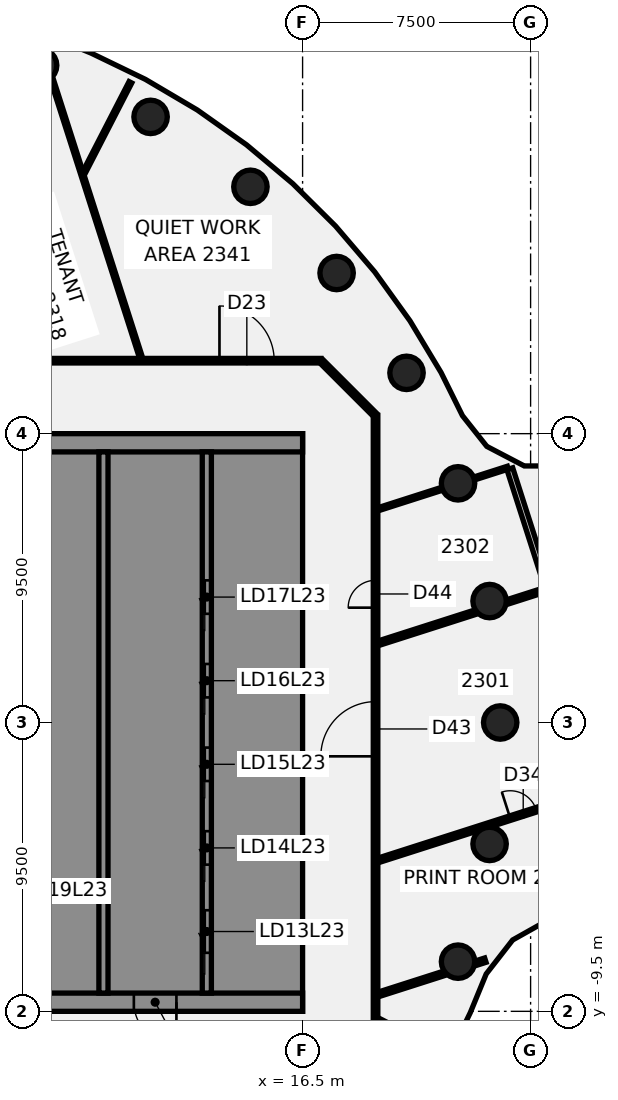
"""IFC4 building model, lengths in metres.
Left out: names, types, materials, properties, quantities, classifications, styles, units other than length and angle.
Written with IfcOpenShell. Run it as: python <this file> out.ifc"""

import sys

from ifc_helpers import new_model, si_unit, direction, frame, frame_2d, origin, origin_2d, place, context, subcontext, project, spatial, polyline, rectangle, circle, outline, extrude, element, fill, save


model = new_model("IFC4")
c1 = context("Model", 3, precision=1e-05, world=origin(), true_north=direction((0.0, 1.0)))
c2 = subcontext(c1, "Body", "Model", "MODEL_VIEW")
j1 = project(units=[si_unit("LENGTHUNIT", "METRE"), si_unit("PLANEANGLEUNIT", "RADIAN")], contexts=[c1])
p1 = place(None, origin())
s1 = spatial("IfcSite", under=j1, at=p1, CompositionType="ELEMENT")
p2 = place(p1, origin())
s2 = spatial("IfcBuilding", under=s1, at=p2, CompositionType="ELEMENT")
p3 = place(p2, frame((0.0, 0.0, 98.5)))
s3 = spatial("IfcBuildingStorey", under=s2, at=p3, CompositionType="ELEMENT", Elevation=98.5)
for number, where, z_axis, x_axis in (
    (1, (23.0, 0.0, -0.14), (0.0, 0.0, 1.0), (1.0, 0.0, 0.0)),
    (2, (22.651, 3.994, -0.14), (0.0, 0.0, 1.0), (1.0, 0.0, 0.0)),
    (3, (21.613, 7.866, -0.14), (0.0, 0.0, 1.0), (1.0, 0.0, 0.0)),
    (4, (19.919, 11.5, -0.14), (0.0, 0.0, 1.0), (1.0, 0.0, 0.0)),
    (5, (17.619, 14.784, -0.14), (0.0, 0.0, 1.0), (1.0, 0.0, 0.0)),
    (6, (14.784, 17.619, -0.14), (0.0, 0.0, 1.0), (1.0, 0.0, 0.0)),
    (7, (11.5, 19.919, -0.14), (0.0, 0.0, 1.0), (1.0, 0.0, 0.0)),
    (8, (7.866, 21.613, -0.14), (0.0, 0.0, 1.0), (1.0, 0.0, 0.0)),
    (9, (21.613, -7.866, -0.14), (0.0, 0.0, 1.0), (1.0, 0.0, 0.0)),
    (10, (22.651, -3.994, -0.14), (0.0, 0.0, 1.0), (1.0, 0.0, 0.0)),
):
    element("IfcColumn", number, at=place(p3, frame(where, z_axis=z_axis, x_axis=x_axis)), inside=s3, PredefinedType="COLUMN", context=c2, shape_type="SweptSolid", body=[
        extrude(circle(Radius=0.55, at=origin_2d()), origin(), (0.0, 0.0, 1.0), 3.75),
    ])
p4 = place(p3, frame((8.232, 21.214, 0.0), z_axis=(0.0, 0.0, 1.0), x_axis=(0.305097010863, -0.952321276651, 0.0)))
e11 = element("IfcWall", 11, at=p4, inside=s3, PredefinedType="PARTITIONING", context=c2, shape_type="SweptSolid", body=[
    extrude(rectangle(XDim=9.705, YDim=0.1, at=frame_2d((4.853, 0.0))), origin(), (0.0, 0.0, 1.0), 3.01),
])
p5 = place(p3, frame((23.316, 8.347, 0.0), z_axis=(0.0, 0.0, 1.0), x_axis=(0.305142571986, -0.952306678944, 0.0)))
e12 = element("IfcWall", 12, at=p5, inside=s3, PredefinedType="PARTITIONING", context=c2, shape_type="SweptSolid", body=[
    extrude(rectangle(XDim=14.246, YDim=0.2, at=frame_2d((7.123, 0.0))), origin(), (0.0, 0.0, 1.0), 3.01),
])
p6 = place(p5, frame((6.948, 0.0, 0.0)))
e13 = element("IfcOpeningElement", 13, at=p6, cuts=e12, PredefinedType="OPENING", context=c2, shape_type="SweptSolid", body=[
    extrude(rectangle(XDim=1.4, YDim=2.1, at=frame_2d((0.7, 1.05))), frame((0.0, 0.11, 0.0), z_axis=(0.0, -1.0, 0.0), x_axis=(1.0, 0.0, 0.0)), (0.0, 0.0, 1.0), 0.22),
])
p7 = place(p3, frame((17.128, 11.872, 0.0), z_axis=(0.0, 0.0, 1.0), x_axis=(0.707106781187, -0.707106781187, 0.0)))
e14 = element("IfcWall", 14, at=p7, inside=s3, PredefinedType="PARTITIONING", context=c2, shape_type="SweptSolid", body=[
    extrude(rectangle(XDim=2.465, YDim=0.15, at=frame_2d((1.232, 0.0))), origin(), (0.0, 0.0, 1.0), 3.01),
])
p8 = place(p3, frame((18.978, -9.763, 0.0), z_axis=(0.0, 0.0, 1.0), x_axis=(0.889170151295, -0.457576706188, 0.0)))
e15 = element("IfcWall", 15, at=p8, inside=s3, PredefinedType="PARTITIONING", context=c2, shape_type="SweptSolid", body=[
    extrude(rectangle(XDim=2.34, YDim=0.1, at=frame_2d((1.17, 0.0))), origin(), (0.0, 0.0, 1.0), 3.01),
])
p9 = place(p3, frame((-17.065, 11.9, 0.0), z_axis=(0.0, 0.0, 1.0), x_axis=(1.0, 0.0, 0.0)))
e16 = element("IfcWall", 16, at=p9, inside=s3, PredefinedType="PARTITIONING", context=c2, shape_type="SweptSolid", body=[
    extrude(rectangle(XDim=34.165, YDim=0.15, at=frame_2d((17.083, 0.0))), origin(), (0.0, 0.0, 1.0), 3.01),
])
p10 = place(p9, frame((19.43, 0.0, 0.0)))
e17 = element("IfcOpeningElement", 17, at=p10, cuts=e16, PredefinedType="OPENING", context=c2, shape_type="SweptSolid", body=[
    extrude(rectangle(XDim=1.8, YDim=2.1, at=frame_2d((0.9, 1.05))), frame((0.0, 0.085, 0.0), z_axis=(0.0, -1.0, 0.0), x_axis=(1.0, 0.0, 0.0)), (0.0, 0.0, 1.0), 0.17),
])
p11 = place(p9, frame((30.831, 0.0, 0.0)))
e18 = element("IfcOpeningElement", 18, at=p11, cuts=e16, PredefinedType="OPENING", context=c2, shape_type="SweptSolid", body=[
    extrude(rectangle(XDim=1.8, YDim=2.1, at=frame_2d((0.9, 1.05))), frame((0.0, 0.085, 0.0), z_axis=(0.0, -1.0, 0.0), x_axis=(1.0, 0.0, 0.0)), (0.0, 0.0, 1.0), 0.17),
])
p12 = place(p9, frame((5.365, 0.0, 0.0)))
e19 = element("IfcOpeningElement", 19, at=p12, cuts=e16, PredefinedType="OPENING", context=c2, shape_type="SweptSolid", body=[
    extrude(rectangle(XDim=1.8, YDim=2.1, at=frame_2d((0.9, 1.05))), frame((0.0, 0.085, 0.0), z_axis=(0.0, -1.0, 0.0), x_axis=(1.0, 0.0, 0.0)), (0.0, 0.0, 1.0), 0.17),
])
p13 = place(p3, frame((18.981, -4.537, 0.0), z_axis=(0.0, 0.0, 1.0), x_axis=(0.952353244945, 0.304997207926, 0.0)))
e20 = element("IfcWall", 20, at=p13, inside=s3, PredefinedType="PARTITIONING", context=c2, shape_type="SweptSolid", body=[
    extrude(rectangle(XDim=7.959, YDim=0.15, at=frame_2d((3.979, 0.0))), origin(), (0.0, 0.0, 1.0), 3.01),
])
p14 = place(p13, frame((4.565, 0.0, 0.0)))
e21 = element("IfcOpeningElement", 21, at=p14, cuts=e20, PredefinedType="OPENING", context=c2, shape_type="SweptSolid", body=[
    extrude(rectangle(XDim=0.9, YDim=2.1, at=frame_2d((0.45, 1.05))), frame((0.0, 0.085, 0.0), z_axis=(0.0, -1.0, 0.0), x_axis=(1.0, 0.0, 0.0)), (0.0, 0.0, 1.0), 0.17),
])
p15 = place(p3, frame((18.981, 2.603, 0.0), z_axis=(0.0, 0.0, 1.0), x_axis=(0.952333666631, 0.305058334423, 0.0)))
e22 = element("IfcWall", 22, at=p15, inside=s3, PredefinedType="PARTITIONING", context=c2, shape_type="SweptSolid", body=[
    extrude(rectangle(XDim=3.417, YDim=0.15, at=frame_2d((1.708, 0.0))), origin(), (0.0, 0.0, 1.0), 3.01),
])
p16 = place(p3, frame((23.2, 3.954, 0.0), z_axis=(0.0, 0.0, 1.0), x_axis=(0.952356992417, 0.304985506204, 0.0)))
e23 = element("IfcWall", 23, at=p16, inside=s3, PredefinedType="PARTITIONING", context=c2, shape_type="SweptSolid", body=[
    extrude(rectangle(XDim=1.351, YDim=0.15, at=frame_2d((0.676, 0.0))), origin(), (0.0, 0.0, 1.0), 3.01),
])
p17 = place(p3, frame((18.971, 7.01, 0.0), z_axis=(0.0, 0.0, 1.0), x_axis=(0.952353091643, 0.30499768661, 0.0)))
e24 = element("IfcWall", 24, at=p17, inside=s3, PredefinedType="PARTITIONING", context=c2, shape_type="SweptSolid", body=[
    extrude(rectangle(XDim=2.235, YDim=0.1, at=frame_2d((1.117, 0.0))), origin(), (0.0, 0.0, 1.0), 3.01),
])
p18 = place(p3, frame((22.131, 8.022, 0.0), z_axis=(0.0, 0.0, 1.0), x_axis=(0.952293891568, 0.305182476696, 0.0)))
e25 = element("IfcWall", 25, at=p18, inside=s3, PredefinedType="PARTITIONING", context=c2, shape_type="SweptSolid", body=[
    extrude(rectangle(XDim=1.176, YDim=0.1, at=frame_2d((0.588, 0.0))), origin(), (0.0, 0.0, 1.0), 3.01),
])
p19 = place(p3, frame((18.981, -8.947, 0.0), z_axis=(0.0, 0.0, 1.0), x_axis=(0.952375767512, 0.30492687231, 0.0)))
e26 = element("IfcWall", 26, at=p19, inside=s3, PredefinedType="PARTITIONING", context=c2, shape_type="SweptSolid", body=[
    extrude(rectangle(XDim=2.344, YDim=0.15, at=frame_2d((1.172, 0.0))), origin(), (0.0, 0.0, 1.0), 3.01),
])
p20 = place(p3, frame((22.156, -7.93, 0.0), z_axis=(0.0, 0.0, 1.0), x_axis=(0.952462013357, 0.304657370026, 0.0)))
e27 = element("IfcWall", 27, at=p20, inside=s3, PredefinedType="PARTITIONING", context=c2, shape_type="SweptSolid", body=[
    extrude(rectangle(XDim=0.374, YDim=0.15, at=frame_2d((0.187, 0.0))), origin(), (0.0, 0.0, 1.0), 3.01),
])
p21 = place(p3, frame((9.309, 18.089, 0.0), z_axis=(0.0, 0.0, 1.0), x_axis=(0.457657037475, 0.889128807344, 0.0)))
e28 = element("IfcWall", 28, at=p21, inside=s3, PredefinedType="PARTITIONING", context=c2, shape_type="SweptSolid", body=[
    extrude(rectangle(XDim=3.338, YDim=0.1, at=frame_2d((1.669, 0.0))), origin(), (0.0, 0.0, 1.0), 3.01),
])
p22 = place(p3, frame((18.9, -10.1, 0.0), z_axis=(0.0, 0.0, 1.0), x_axis=(0.0, 1.0, 0.0)))
e29 = element("IfcWall", 29, at=p22, inside=s3, PredefinedType="PARTITIONING", context=c2, shape_type="SweptSolid", body=[
    extrude(rectangle(XDim=20.2, YDim=0.15, at=frame_2d((10.1, 0.0))), origin(), (0.0, 0.0, 1.0), 3.01),
])
p23 = place(p22, frame((8.987, 0.0, 0.0)))
e30 = element("IfcOpeningElement", 30, at=p23, cuts=e29, PredefinedType="OPENING", context=c2, shape_type="SweptSolid", body=[
    extrude(rectangle(XDim=1.8, YDim=2.1, at=frame_2d((0.9, 1.05))), frame((0.0, 0.085, 0.0), z_axis=(0.0, -1.0, 0.0), x_axis=(1.0, 0.0, 0.0)), (0.0, 0.0, 1.0), 0.17),
])
p24 = place(p22, frame((13.877, 0.0, 0.0)))
e31 = element("IfcOpeningElement", 31, at=p24, cuts=e29, PredefinedType="OPENING", context=c2, shape_type="SweptSolid", body=[
    extrude(rectangle(XDim=0.9, YDim=2.1, at=frame_2d((0.45, 1.05))), frame((0.0, 0.085, 0.0), z_axis=(0.0, -1.0, 0.0), x_axis=(1.0, 0.0, 0.0)), (0.0, 0.0, 1.0), 0.17),
])
p25 = place(p3, frame((16.5, -9.2, 0.0), z_axis=(0.0, 0.0, 1.0), x_axis=(-1.0, 0.0, 0.0)))
e32 = element("IfcWall", 32, at=p25, inside=s3, PredefinedType="SHEAR", context=c2, shape_type="SweptSolid", body=[
    extrude(rectangle(XDim=13.0, YDim=0.6, at=frame_2d((6.5, 0.0))), origin(), (0.0, 0.0, 1.0), 3.61),
])
p26 = place(p25, frame((4.15, 0.0, 0.0)))
e33 = element("IfcOpeningElement", 33, at=p26, cuts=e32, PredefinedType="OPENING", context=c2, shape_type="SweptSolid", body=[
    extrude(rectangle(XDim=1.4, YDim=2.1, at=frame_2d((0.7, 1.05))), frame((0.0, 0.31, 0.0), z_axis=(0.0, -1.0, 0.0), x_axis=(1.0, 0.0, 0.0)), (0.0, 0.0, 1.0), 0.62),
])
p27 = place(p25, frame((10.125, 0.0, 0.0)))
e34 = element("IfcOpeningElement", 34, at=p27, cuts=e32, PredefinedType="OPENING", context=c2, shape_type="SweptSolid", body=[
    extrude(rectangle(XDim=1.4, YDim=2.1, at=frame_2d((0.7, 1.05))), frame((0.0, 0.31, 0.0), z_axis=(0.0, -1.0, 0.0), x_axis=(1.0, 0.0, 0.0)), (0.0, 0.0, 1.0), 0.62),
])
p28 = place(p3, origin())
e35 = element("IfcWall", 35, at=p28, inside=s3, PredefinedType="SHEAR", context=c2, shape_type="SweptSolid", body=[
    extrude(outline(polyline([(13.5, -8.9), (15.9, -8.9), (16.5, -8.9), (16.5, 8.9), (15.9, 8.9), (13.5, 8.9), (13.5, 8.125), (15.9, 8.125), (15.9, 5.625), (13.5, 5.625), (13.5, 5.375), (15.9, 5.375), (15.9, 2.875), (13.5, 2.875), (13.5, 2.625), (15.9, 2.625), (15.9, 0.125), (13.5, 0.125), (13.5, -0.125), (15.9, -0.125), (15.9, -2.625), (13.5, -2.625), (13.5, -2.875), (15.9, -2.875), (15.9, -5.375), (13.5, -5.375), (13.5, -5.625), (15.9, -5.625), (15.9, -8.125), (13.5, -8.125), (13.5, -8.9)])), origin(), (0.0, 0.0, 1.0), 3.61),
])
p29 = place(p3, frame((16.5, 9.2, 0.0), z_axis=(0.0, 0.0, 1.0), x_axis=(-1.0, 0.0, 0.0)))
e36 = element("IfcWall", 36, at=p29, inside=s3, PredefinedType="SHEAR", context=c2, shape_type="SweptSolid", body=[
    extrude(rectangle(XDim=13.0, YDim=0.6, at=frame_2d((6.5, 0.0))), origin(), (0.0, 0.0, 1.0), 3.61),
])
p30 = place(p3, origin())
e37 = element("IfcWall", 37, at=p30, inside=s3, PredefinedType="SHEAR", context=c2, shape_type="SweptSolid", body=[
    extrude(outline(polyline([(9.8, -5.375), (7.5, -5.375), (7.5, -2.875), (9.8, -2.875), (9.8, -2.625), (7.5, -2.625), (7.5, -0.125), (9.8, -0.125), (9.8, 0.125), (7.5, 0.125), (7.5, 2.625), (9.8, 2.625), (9.8, 2.875), (7.5, 2.875), (7.5, 5.375), (9.8, 5.375), (9.8, 5.625), (7.5, 5.625), (7.5, 8.125), (9.8, 8.125), (9.8, 8.9), (7.5, 8.9), (7.2, 8.9), (7.2, -5.625), (7.5, -5.625), (9.8, -5.625), (9.8, -5.375)])), origin(), (0.0, 0.0, 1.0), 3.61),
])
p31 = place(p3, origin())
e38 = element("IfcWall", 38, at=p31, inside=s3, PredefinedType="SHEAR", context=c2, shape_type="SweptSolid", body=[
    extrude(outline(polyline([(7.5, -8.125), (7.5, -8.9), (9.8, -8.9), (9.8, -8.125), (9.8, -5.625), (9.55, -5.625), (9.55, -8.125), (7.5, -8.125)])), origin(), (0.0, 0.0, 1.0), 3.61),
])
p32 = place(p3, frame((13.35, -8.9, 0.0), z_axis=(0.0, 0.0, 1.0), x_axis=(0.0, 1.0, 0.0)))
e39 = element("IfcWall", 39, at=p32, inside=s3, PredefinedType="SHEAR", context=c2, shape_type="SweptSolid", body=[
    extrude(rectangle(XDim=17.8, YDim=0.3, at=frame_2d((8.9, 0.0))), origin(), (0.0, 0.0, 1.0), 3.61),
])
p33 = place(p32, frame((1.325, 0.0, 0.0)))
e40 = element("IfcOpeningElement", 40, at=p33, cuts=e39, PredefinedType="OPENING", context=c2, shape_type="SweptSolid", body=[
    extrude(rectangle(XDim=1.4, YDim=2.1, at=frame_2d((0.7, 1.05))), frame((0.0, 0.16, 0.0), z_axis=(0.0, -1.0, 0.0), x_axis=(1.0, 0.0, 0.0)), (0.0, 0.0, 1.0), 0.32),
])
p34 = place(p32, frame((4.225, 0.0, 0.0)))
e41 = element("IfcOpeningElement", 41, at=p34, cuts=e39, PredefinedType="OPENING", context=c2, shape_type="SweptSolid", body=[
    extrude(rectangle(XDim=1.1, YDim=2.1, at=frame_2d((0.55, 1.05))), frame((0.0, 0.16, 0.0), z_axis=(0.0, -1.0, 0.0), x_axis=(1.0, 0.0, 0.0)), (0.0, 0.0, 1.0), 0.32),
])
p35 = place(p32, frame((6.975, 0.0, 0.0)))
e42 = element("IfcOpeningElement", 42, at=p35, cuts=e39, PredefinedType="OPENING", context=c2, shape_type="SweptSolid", body=[
    extrude(rectangle(XDim=1.1, YDim=2.1, at=frame_2d((0.55, 1.05))), frame((0.0, 0.16, 0.0), z_axis=(0.0, -1.0, 0.0), x_axis=(1.0, 0.0, 0.0)), (0.0, 0.0, 1.0), 0.32),
])
p36 = place(p32, frame((9.725, 0.0, 0.0)))
e43 = element("IfcOpeningElement", 43, at=p36, cuts=e39, PredefinedType="OPENING", context=c2, shape_type="SweptSolid", body=[
    extrude(rectangle(XDim=1.1, YDim=2.1, at=frame_2d((0.55, 1.05))), frame((0.0, 0.16, 0.0), z_axis=(0.0, -1.0, 0.0), x_axis=(1.0, 0.0, 0.0)), (0.0, 0.0, 1.0), 0.32),
])
p37 = place(p32, frame((12.475, 0.0, 0.0)))
e44 = element("IfcOpeningElement", 44, at=p37, cuts=e39, PredefinedType="OPENING", context=c2, shape_type="SweptSolid", body=[
    extrude(rectangle(XDim=1.1, YDim=2.1, at=frame_2d((0.55, 1.05))), frame((0.0, 0.16, 0.0), z_axis=(0.0, -1.0, 0.0), x_axis=(1.0, 0.0, 0.0)), (0.0, 0.0, 1.0), 0.32),
])
p38 = place(p3, frame((9.95, -8.9, 0.0), z_axis=(0.0, 0.0, 1.0), x_axis=(0.0, 1.0, 0.0)))
e45 = element("IfcWall", 45, at=p38, inside=s3, PredefinedType="SHEAR", context=c2, shape_type="SweptSolid", body=[
    extrude(rectangle(XDim=17.8, YDim=0.3, at=frame_2d((8.9, 0.0))), origin(), (0.0, 0.0, 1.0), 3.61),
])
p39 = place(p11, origin())
e46 = element("IfcDoor", 46, at=p39, inside=s3, OperationType="DOUBLE_DOOR_SINGLE_SWING", PredefinedType="DOOR", context=c2, shape_type="SweptSolid", body=[
    extrude(rectangle(XDim=1.8, YDim=2.1, at=frame_2d((0.9, 1.05))), frame((0.0, 0.025, 0.0), z_axis=(0.0, -1.0, 0.0), x_axis=(1.0, 0.0, 0.0)), (0.0, 0.0, 1.0), 0.05),
])
fill(e18, e46)
p40 = place(p14, frame((0.9, 0.0, 0.0), z_axis=(0.0, 0.0, 1.0), x_axis=(-1.0, 0.0, 0.0)))
e47 = element("IfcDoor", 47, at=p40, inside=s3, OperationType="SINGLE_SWING_RIGHT", PredefinedType="DOOR", context=c2, shape_type="SweptSolid", body=[
    extrude(rectangle(XDim=0.9, YDim=2.1, at=frame_2d((0.45, 1.05))), frame((0.0, 0.025, 0.0), z_axis=(0.0, -1.0, 0.0), x_axis=(1.0, 0.0, 0.0)), (0.0, 0.0, 1.0), 0.05),
])
fill(e21, e47)
p41 = place(p23, origin())
e48 = element("IfcDoor", 48, at=p41, inside=s3, OperationType="DOUBLE_DOOR_SINGLE_SWING", PredefinedType="DOOR", context=c2, shape_type="SweptSolid", body=[
    extrude(rectangle(XDim=1.8, YDim=2.1, at=frame_2d((0.9, 1.05))), frame((0.0, 0.025, 0.0), z_axis=(0.0, -1.0, 0.0), x_axis=(1.0, 0.0, 0.0)), (0.0, 0.0, 1.0), 0.05),
])
fill(e30, e48)
p42 = place(p24, frame((0.9, 0.0, 0.0), z_axis=(0.0, 0.0, 1.0), x_axis=(-1.0, 0.0, 0.0)))
e49 = element("IfcDoor", 49, at=p42, inside=s3, OperationType="SINGLE_SWING_RIGHT", PredefinedType="DOOR", context=c2, shape_type="SweptSolid", body=[
    extrude(rectangle(XDim=0.9, YDim=2.1, at=frame_2d((0.45, 1.05))), frame((0.0, 0.025, 0.0), z_axis=(0.0, -1.0, 0.0), x_axis=(1.0, 0.0, 0.0)), (0.0, 0.0, 1.0), 0.05),
])
fill(e31, e49)
p43 = place(p26, origin())
e50 = element("IfcDoor", 50, at=p43, inside=s3, OperationType="SINGLE_SWING_LEFT", PredefinedType="DOOR", context=c2, shape_type="SweptSolid", body=[
    extrude(rectangle(XDim=1.4, YDim=2.1, at=frame_2d((0.7, 1.05))), frame((0.0, 0.025, 0.0), z_axis=(0.0, -1.0, 0.0), x_axis=(1.0, 0.0, 0.0)), (0.0, 0.0, 1.0), 0.05),
])
fill(e33, e50)
p44 = place(p33, origin())
e51 = element("IfcDoor", 51, at=p44, inside=s3, OperationType="SLIDING_TO_LEFT", PredefinedType="DOOR", context=c2, shape_type="SweptSolid", body=[
    extrude(rectangle(XDim=1.4, YDim=2.1, at=frame_2d((0.7, 1.05))), frame((0.0, 0.025, 0.0), z_axis=(0.0, -1.0, 0.0), x_axis=(1.0, 0.0, 0.0)), (0.0, 0.0, 1.0), 0.05),
])
fill(e40, e51)
p45 = place(p34, origin())
e52 = element("IfcDoor", 52, at=p45, inside=s3, OperationType="SLIDING_TO_LEFT", PredefinedType="DOOR", context=c2, shape_type="SweptSolid", body=[
    extrude(rectangle(XDim=1.1, YDim=2.1, at=frame_2d((0.55, 1.05))), frame((0.0, 0.025, 0.0), z_axis=(0.0, -1.0, 0.0), x_axis=(1.0, 0.0, 0.0)), (0.0, 0.0, 1.0), 0.05),
])
fill(e41, e52)
p46 = place(p35, origin())
e53 = element("IfcDoor", 53, at=p46, inside=s3, OperationType="SLIDING_TO_LEFT", PredefinedType="DOOR", context=c2, shape_type="SweptSolid", body=[
    extrude(rectangle(XDim=1.1, YDim=2.1, at=frame_2d((0.55, 1.05))), frame((0.0, 0.025, 0.0), z_axis=(0.0, -1.0, 0.0), x_axis=(1.0, 0.0, 0.0)), (0.0, 0.0, 1.0), 0.05),
])
fill(e42, e53)
p47 = place(p36, origin())
e54 = element("IfcDoor", 54, at=p47, inside=s3, OperationType="SLIDING_TO_LEFT", PredefinedType="DOOR", context=c2, shape_type="SweptSolid", body=[
    extrude(rectangle(XDim=1.1, YDim=2.1, at=frame_2d((0.55, 1.05))), frame((0.0, 0.025, 0.0), z_axis=(0.0, -1.0, 0.0), x_axis=(1.0, 0.0, 0.0)), (0.0, 0.0, 1.0), 0.05),
])
fill(e43, e54)
p48 = place(p37, origin())
e55 = element("IfcDoor", 55, at=p48, inside=s3, OperationType="SLIDING_TO_LEFT", PredefinedType="DOOR", context=c2, shape_type="SweptSolid", body=[
    extrude(rectangle(XDim=1.1, YDim=2.1, at=frame_2d((0.55, 1.05))), frame((0.0, 0.025, 0.0), z_axis=(0.0, -1.0, 0.0), x_axis=(1.0, 0.0, 0.0)), (0.0, 0.0, 1.0), 0.05),
])
fill(e44, e55)
save(model, sys.argv[1])
